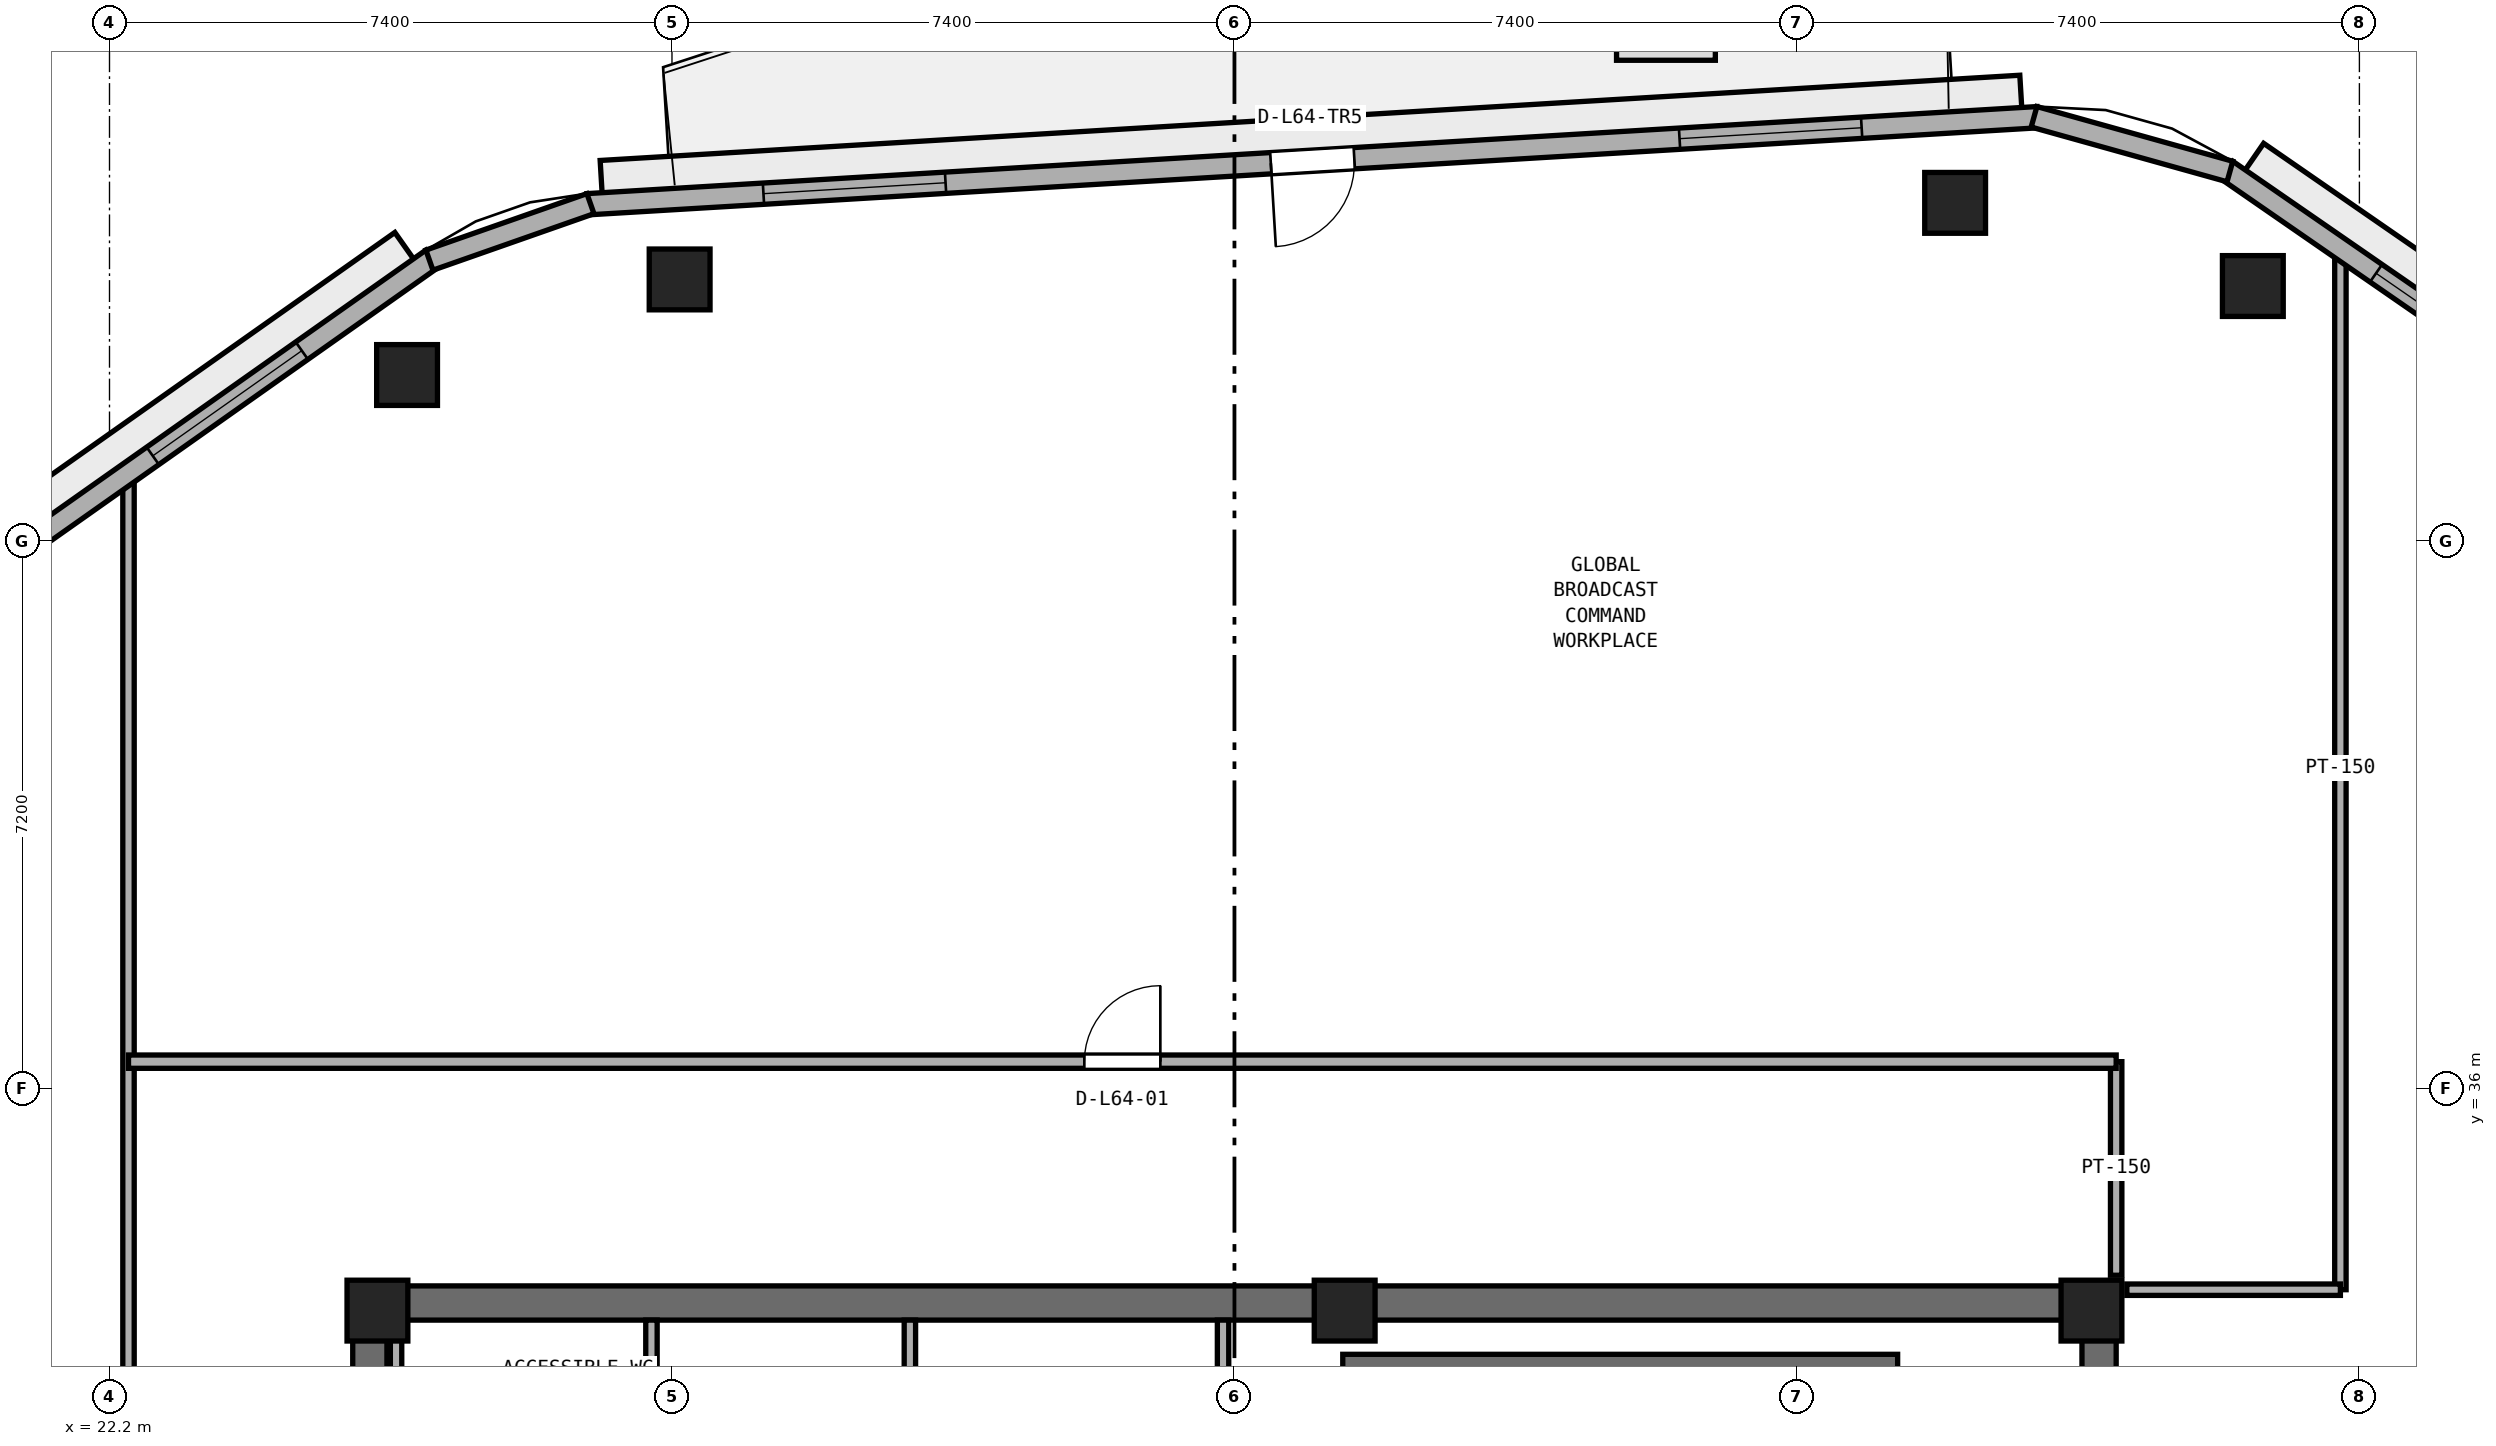
"""IFC4 building model, lengths in metres.
Left out: names, types, materials, properties, quantities, classifications, styles, units other than length and angle.
Written with IfcOpenShell. Run it as: python <this file> out.ifc"""

import sys

from ifc_helpers import new_model, si_unit, direction, frame, frame_2d, origin, origin_2d, place, context, subcontext, project, spatial, rectangle, extrude, element, fill, save


model = new_model("IFC4")
c1 = context("Model", 3, precision=1e-05, world=origin(), true_north=direction((0.0, 1.0)))
c2 = subcontext(c1, "Body", "Model", "MODEL_VIEW")
j1 = project(units=[si_unit("LENGTHUNIT", "METRE"), si_unit("PLANEANGLEUNIT", "RADIAN")], contexts=[c1])
p1 = place(None, origin())
s1 = spatial("IfcSite", under=j1, at=p1, CompositionType="ELEMENT")
p2 = place(p1, origin())
s2 = spatial("IfcBuilding", under=s1, at=p2, CompositionType="ELEMENT")
p3 = place(p2, frame((0.0, 0.0, 251.6)))
s3 = spatial("IfcBuildingStorey", under=s2, at=p3, CompositionType="ELEMENT", Elevation=251.6)
p4 = place(p3, frame((25.4, 33.175, 0.0), z_axis=(0.0, 0.0, 1.0), x_axis=(1.0, 0.0, 0.0)))
e1 = element("IfcWall", 1, at=p4, inside=s3, PredefinedType="SHEAR", context=c2, shape_type="SweptSolid", body=[
    extrude(rectangle(XDim=23.2, YDim=0.45, at=frame_2d((11.6, 0.0))), origin(), (0.0, 0.0, 1.0), 3.51),
])
p5 = place(p3, frame((25.625, 17.45, 0.0), z_axis=(0.0, 0.0, 1.0), x_axis=(0.0, 1.0, 0.0)))
e2 = element("IfcWall", 2, at=p5, inside=s3, PredefinedType="SHEAR", context=c2, shape_type="SweptSolid", body=[
    extrude(rectangle(XDim=15.5, YDim=0.45, at=frame_2d((7.75, 0.0))), origin(), (0.0, 0.0, 1.0), 3.51),
])
p6 = place(p5, frame((7.0, 0.0, 0.0)))
e3 = element("IfcOpeningElement", 3, at=p6, cuts=e2, PredefinedType="OPENING", context=c2, shape_type="SweptSolid", body=[
    extrude(rectangle(XDim=1.5, YDim=2.15, at=frame_2d((0.75, 1.075))), frame((0.0, 0.235, 0.0), z_axis=(0.0, -1.0, 0.0), x_axis=(1.0, 0.0, 0.0)), (0.0, 0.0, 1.0), 0.47),
])
p7 = place(p3, frame((48.375, 17.45, 0.0), z_axis=(0.0, 0.0, 1.0), x_axis=(0.0, 1.0, 0.0)))
e4 = element("IfcWall", 4, at=p7, inside=s3, PredefinedType="SHEAR", context=c2, shape_type="SweptSolid", body=[
    extrude(rectangle(XDim=15.5, YDim=0.45, at=frame_2d((7.75, 0.0))), origin(), (0.0, 0.0, 1.0), 3.51),
])
p8 = place(p7, frame((5.85, 0.0, 0.0)))
e5 = element("IfcOpeningElement", 5, at=p8, cuts=e4, PredefinedType="OPENING", context=c2, shape_type="SweptSolid", body=[
    extrude(rectangle(XDim=1.5, YDim=2.15, at=frame_2d((0.75, 1.075))), frame((0.0, 0.235, 0.0), z_axis=(0.0, -1.0, 0.0), x_axis=(1.0, 0.0, 0.0)), (0.0, 0.0, 1.0), 0.47),
])
for number, where, z_axis, x_axis in (
    (6, (48.275, 33.075, 0.0), (0.0, 0.0, 1.0), (1.0, 0.0, 0.0)),
    (7, (38.45, 33.075, 0.0), (0.0, 0.0, 1.0), (1.0, 0.0, 0.0)),
    (8, (25.725, 33.075, 0.0), (0.0, 0.0, 1.0), (1.0, 0.0, 0.0)),
):
    element("IfcColumn", number, at=place(p3, frame(where, z_axis=z_axis, x_axis=x_axis)), inside=s3, PredefinedType="PILASTER", context=c2, shape_type="SweptSolid", body=[
        extrude(rectangle(XDim=0.8, YDim=0.8, at=origin_2d()), origin(), (0.0, 0.0, 1.0), 3.8),
    ])
for number, where, z_axis, x_axis in (
    (9, (50.398, 46.554, 0.0), (0.0, 0.0, 1.0), (1.0, 0.0, 0.0)),
    (10, (46.481, 47.648, 0.0), (0.0, 0.0, 1.0), (1.0, 0.0, 0.0)),
    (11, (29.701, 46.641, 0.0), (0.0, 0.0, 1.0), (1.0, 0.0, 0.0)),
    (12, (26.115, 45.384, 0.0), (0.0, 0.0, 1.0), (1.0, 0.0, 0.0)),
):
    element("IfcColumn", number, at=place(p3, frame(where, z_axis=z_axis, x_axis=x_axis)), inside=s3, PredefinedType="COLUMN", context=c2, shape_type="SweptSolid", body=[
        extrude(rectangle(XDim=0.8, YDim=0.8, at=origin_2d()), origin(), (0.0, 0.0, 1.0), 3.8),
    ])
p9 = place(p3, frame((38.425, 32.375, 0.0), z_axis=(0.0, 0.0, 1.0), x_axis=(1.0, 0.0, 0.0)))
e13 = element("IfcWall", 13, at=p9, inside=s3, PredefinedType="SHEAR", context=c2, shape_type="SweptSolid", body=[
    extrude(rectangle(XDim=7.3, YDim=0.25, at=frame_2d((3.65, 0.0))), origin(), (0.0, 0.0, 1.0), 3.51),
])
p10 = place(p3, frame((25.97, 30.65, 0.0), z_axis=(0.0, 0.0, 1.0), x_axis=(0.0, 1.0, 0.0)))
e14 = element("IfcWall", 14, at=p10, inside=s3, PredefinedType="PARTITIONING", context=c2, shape_type="SweptSolid", body=[
    extrude(rectangle(XDim=2.3, YDim=0.15, at=frame_2d((1.15, 0.0))), origin(), (0.0, 0.0, 1.0), 2.61),
])
for number, where, z_axis, x_axis in (
    (15, (29.33, 30.65, 0.0), (0.0, 0.0, 1.0), (0.0, 1.0, 0.0)),
    (16, (32.73, 30.65, 0.0), (0.0, 0.0, 1.0), (0.0, 1.0, 0.0)),
    (17, (36.85, 30.65, 0.0), (0.0, 0.0, 1.0), (0.0, 1.0, 0.0)),
):
    element("IfcWall", number, at=place(p3, frame(where, z_axis=z_axis, x_axis=x_axis)), inside=s3, PredefinedType="PARTITIONING", context=c2, shape_type="SweptSolid", body=[
        extrude(rectangle(XDim=2.3, YDim=0.15, at=frame_2d((1.15, 0.0))), origin(), (0.0, 0.0, 1.0), 3.51),
    ])
p11 = place(p3, frame((51.55, 33.35, 0.0), z_axis=(0.0, 0.0, 1.0), x_axis=(0.0, 1.0, 0.0)))
e18 = element("IfcWall", 18, at=p11, inside=s3, PredefinedType="PARTITIONING", context=c2, shape_type="SweptSolid", body=[
    extrude(rectangle(XDim=13.727, YDim=0.15, at=frame_2d((6.863, 0.0))), origin(), (0.0, 0.0, 1.0), 3.51),
])
p12 = place(p3, frame((48.6, 33.54, 0.0), z_axis=(0.0, 0.0, 1.0), x_axis=(0.0, 1.0, 0.0)))
e19 = element("IfcWall", 19, at=p12, inside=s3, PredefinedType="PARTITIONING", context=c2, shape_type="SweptSolid", body=[
    extrude(rectangle(XDim=2.81, YDim=0.15, at=frame_2d((1.405, 0.0))), origin(), (0.0, 0.0, 1.0), 2.893),
])
p13 = place(p3, frame((22.45, 6.02, 0.0), z_axis=(0.0, 0.0, 1.0), x_axis=(0.0, 1.0, 0.0)))
e20 = element("IfcWall", 20, at=p13, inside=s3, PredefinedType="PARTITIONING", context=c2, shape_type="SweptSolid", body=[
    extrude(rectangle(XDim=38.106, YDim=0.15, at=frame_2d((19.053, 0.0))), origin(), (0.0, 0.0, 1.0), 3.51),
])
p14 = place(p13, frame((11.005, 0.0, 0.0)))
e21 = element("IfcOpeningElement", 21, at=p14, cuts=e20, PredefinedType="OPENING", context=c2, shape_type="SweptSolid", body=[
    extrude(rectangle(XDim=0.9, YDim=2.1, at=frame_2d((0.45, 1.05))), frame((0.0, 0.085, 0.0), z_axis=(0.0, -1.0, 0.0), x_axis=(1.0, 0.0, 0.0)), (0.0, 0.0, 1.0), 0.17),
])
p15 = place(p13, frame((22.155, 0.0, 0.0)))
e22 = element("IfcOpeningElement", 22, at=p15, cuts=e20, PredefinedType="OPENING", context=c2, shape_type="SweptSolid", body=[
    extrude(rectangle(XDim=0.9, YDim=2.1, at=frame_2d((0.45, 1.05))), frame((0.0, 0.085, 0.0), z_axis=(0.0, -1.0, 0.0), x_axis=(1.0, 0.0, 0.0)), (0.0, 0.0, 1.0), 0.17),
])
p16 = place(p3, frame((48.74, 33.35, 0.0), z_axis=(0.0, 0.0, 1.0), x_axis=(1.0, 0.0, 0.0)))
e23 = element("IfcWall", 23, at=p16, inside=s3, PredefinedType="PARTITIONING", context=c2, shape_type="SweptSolid", body=[
    extrude(rectangle(XDim=2.81, YDim=0.15, at=frame_2d((1.405, 0.0))), origin(), (0.0, 0.0, 1.0), 2.893),
])
p17 = place(p3, frame((22.45, 36.35, 0.0), z_axis=(0.0, 0.0, 1.0), x_axis=(1.0, 0.0, 0.0)))
e24 = element("IfcWall", 24, at=p17, inside=s3, PredefinedType="PARTITIONING", context=c2, shape_type="SweptSolid", body=[
    extrude(rectangle(XDim=26.15, YDim=0.175, at=frame_2d((13.075, 0.0))), origin(), (0.0, 0.0, 1.0), 3.51),
])
p18 = place(p17, frame((12.575, 0.0, 0.0)))
e25 = element("IfcOpeningElement", 25, at=p18, cuts=e24, PredefinedType="OPENING", context=c2, shape_type="SweptSolid", body=[
    extrude(rectangle(XDim=1.0, YDim=2.12, at=frame_2d((0.5, 1.06))), frame((0.0, 0.097, 0.0), z_axis=(0.0, -1.0, 0.0), x_axis=(1.0, 0.0, 0.0)), (0.0, 0.0, 1.0), 0.195),
])
p19 = place(p3, frame((63.651, 38.683, 0.0), z_axis=(0.0, 0.0, 1.0), x_axis=(-0.822655095, 0.568540759022, 0.0)))
e26 = element("IfcWall", 26, at=p19, inside=s3, PredefinedType="STANDARD", context=c2, shape_type="SweptSolid", body=[
    extrude(rectangle(XDim=16.528, YDim=0.28, at=frame_2d((8.264, 0.0))), origin(), (0.0, 0.0, 1.0), 3.51),
])
p20 = place(p19, frame((1.888, 0.0, 0.9)))
e27 = element("IfcOpeningElement", 27, at=p20, cuts=e26, PredefinedType="OPENING", context=c2, shape_type="SweptSolid", body=[
    extrude(rectangle(XDim=2.4, YDim=1.75, at=frame_2d((1.2, 0.875))), frame((0.0, 0.15, 0.0), z_axis=(0.0, -1.0, 0.0), x_axis=(1.0, 0.0, 0.0)), (0.0, 0.0, 1.0), 0.3),
])
p21 = place(p19, frame((7.064, 0.0, 0.9)))
e28 = element("IfcOpeningElement", 28, at=p21, cuts=e26, PredefinedType="OPENING", context=c2, shape_type="SweptSolid", body=[
    extrude(rectangle(XDim=2.4, YDim=1.75, at=frame_2d((1.2, 0.875))), frame((0.0, 0.15, 0.0), z_axis=(0.0, -1.0, 0.0), x_axis=(1.0, 0.0, 0.0)), (0.0, 0.0, 1.0), 0.3),
])
p22 = place(p19, frame((11.74, 0.0, 0.9)))
e29 = element("IfcOpeningElement", 29, at=p22, cuts=e26, PredefinedType="OPENING", context=c2, shape_type="SweptSolid", body=[
    extrude(rectangle(XDim=2.4, YDim=1.75, at=frame_2d((1.2, 0.875))), frame((0.0, 0.15, 0.0), z_axis=(0.0, -1.0, 0.0), x_axis=(1.0, 0.0, 0.0)), (0.0, 0.0, 1.0), 0.3),
])
p23 = place(p3, frame((47.566, 48.775, 0.0), z_axis=(0.0, 0.0, 1.0), x_axis=(-0.998202767485, -0.059926913695, 0.0)))
e30 = element("IfcWall", 30, at=p23, inside=s3, PredefinedType="STANDARD", context=c2, shape_type="SweptSolid", body=[
    extrude(rectangle(XDim=19.111, YDim=0.28, at=frame_2d((9.556, 0.0))), origin(), (0.0, 0.0, 1.0), 3.51),
])
p24 = place(p23, frame((9.005, 0.0, 0.0)))
e31 = element("IfcOpeningElement", 31, at=p24, cuts=e30, PredefinedType="OPENING", context=c2, shape_type="SweptSolid", body=[
    extrude(rectangle(XDim=1.1, YDim=2.2, at=frame_2d((0.55, 1.1))), frame((0.0, 0.15, 0.0), z_axis=(0.0, -1.0, 0.0), x_axis=(1.0, 0.0, 0.0)), (0.0, 0.0, 1.0), 0.3),
])
p25 = place(p23, frame((2.319, 0.0, 0.9)))
e32 = element("IfcOpeningElement", 32, at=p25, cuts=e30, PredefinedType="OPENING", context=c2, shape_type="SweptSolid", body=[
    extrude(rectangle(XDim=2.4, YDim=1.75, at=frame_2d((1.2, 0.875))), frame((0.0, 0.15, 0.0), z_axis=(0.0, -1.0, 0.0), x_axis=(1.0, 0.0, 0.0)), (0.0, 0.0, 1.0), 0.3),
])
p26 = place(p23, frame((14.392, 0.0, 0.9)))
e33 = element("IfcOpeningElement", 33, at=p26, cuts=e30, PredefinedType="OPENING", context=c2, shape_type="SweptSolid", body=[
    extrude(rectangle(XDim=2.4, YDim=1.75, at=frame_2d((1.2, 0.875))), frame((0.0, 0.15, 0.0), z_axis=(0.0, -1.0, 0.0), x_axis=(1.0, 0.0, 0.0)), (0.0, 0.0, 1.0), 0.3),
])
p27 = place(p3, frame((26.443, 46.913, 0.0), z_axis=(0.0, 0.0, 1.0), x_axis=(-0.817024179766, -0.576603407619, 0.0)))
e34 = element("IfcWall", 34, at=p27, inside=s3, PredefinedType="STANDARD", context=c2, shape_type="SweptSolid", body=[
    extrude(rectangle(XDim=17.78, YDim=0.28, at=frame_2d((8.89, 0.0))), origin(), (0.0, 0.0, 1.0), 3.51),
])
p28 = place(p27, frame((2.097, 0.0, 0.9)))
e35 = element("IfcOpeningElement", 35, at=p28, cuts=e34, PredefinedType="OPENING", context=c2, shape_type="SweptSolid", body=[
    extrude(rectangle(XDim=2.4, YDim=1.75, at=frame_2d((1.2, 0.875))), frame((0.0, 0.15, 0.0), z_axis=(0.0, -1.0, 0.0), x_axis=(1.0, 0.0, 0.0)), (0.0, 0.0, 1.0), 0.3),
])
p29 = place(p27, frame((7.69, 0.0, 0.9)))
e36 = element("IfcOpeningElement", 36, at=p29, cuts=e34, PredefinedType="OPENING", context=c2, shape_type="SweptSolid", body=[
    extrude(rectangle(XDim=2.4, YDim=1.75, at=frame_2d((1.2, 0.875))), frame((0.0, 0.15, 0.0), z_axis=(0.0, -1.0, 0.0), x_axis=(1.0, 0.0, 0.0)), (0.0, 0.0, 1.0), 0.3),
])
p30 = place(p27, frame((13.283, 0.0, 0.9)))
e37 = element("IfcOpeningElement", 37, at=p30, cuts=e34, PredefinedType="OPENING", context=c2, shape_type="SweptSolid", body=[
    extrude(rectangle(XDim=2.4, YDim=1.75, at=frame_2d((1.2, 0.875))), frame((0.0, 0.15, 0.0), z_axis=(0.0, -1.0, 0.0), x_axis=(1.0, 0.0, 0.0)), (0.0, 0.0, 1.0), 0.3),
])
p31 = place(p3, frame((50.096, 48.061, 0.0), z_axis=(0.0, 0.0, 1.0), x_axis=(-0.963108887091, 0.269112005688, 0.0)))
e38 = element("IfcWall", 38, at=p31, inside=s3, PredefinedType="STANDARD", context=c2, shape_type="SweptSolid", body=[
    extrude(rectangle(XDim=2.675, YDim=0.28, at=frame_2d((1.338, 0.0))), origin(), (0.0, 0.0, 1.0), 3.51),
])
p32 = place(p3, frame((28.527, 47.638, 0.0), z_axis=(0.0, 0.0, 1.0), x_axis=(-0.943686979207, -0.330839667022, 0.0)))
e39 = element("IfcWall", 39, at=p32, inside=s3, PredefinedType="STANDARD", context=c2, shape_type="SweptSolid", body=[
    extrude(rectangle(XDim=2.245, YDim=0.28, at=frame_2d((1.123, 0.0))), origin(), (0.0, 0.0, 1.0), 3.51),
])
p33 = place(p18, origin())
e40 = element("IfcDoor", 40, at=p33, inside=s3, OperationType="SINGLE_SWING_RIGHT", PredefinedType="DOOR", context=c2, shape_type="SweptSolid", body=[
    extrude(rectangle(XDim=1.0, YDim=2.12, at=frame_2d((0.5, 1.06))), frame((0.0, 0.025, 0.0), z_axis=(0.0, -1.0, 0.0), x_axis=(1.0, 0.0, 0.0)), (0.0, 0.0, 1.0), 0.05),
])
fill(e25, e40)
p34 = place(p22, origin())
e41 = element("IfcWindow", 41, at=p34, inside=s3, PartitioningType="SINGLE_PANEL", PredefinedType="WINDOW", context=c2, shape_type="SweptSolid", body=[
    extrude(rectangle(XDim=2.4, YDim=1.75, at=frame_2d((1.2, 0.875))), frame((0.0, 0.03, 0.0), z_axis=(0.0, -1.0, 0.0), x_axis=(1.0, 0.0, 0.0)), (0.0, 0.0, 1.0), 0.06),
])
fill(e29, e41)
p35 = place(p24, origin())
e42 = element("IfcDoor", 42, at=p35, inside=s3, OperationType="SINGLE_SWING_RIGHT", PredefinedType="DOOR", context=c2, shape_type="SweptSolid", body=[
    extrude(rectangle(XDim=1.1, YDim=2.2, at=frame_2d((0.55, 1.1))), frame((0.0, 0.025, 0.0), z_axis=(0.0, -1.0, 0.0), x_axis=(1.0, 0.0, 0.0)), (0.0, 0.0, 1.0), 0.05),
])
fill(e31, e42)
p36 = place(p25, origin())
e43 = element("IfcWindow", 43, at=p36, inside=s3, PartitioningType="SINGLE_PANEL", PredefinedType="WINDOW", context=c2, shape_type="SweptSolid", body=[
    extrude(rectangle(XDim=2.4, YDim=1.75, at=frame_2d((1.2, 0.875))), frame((0.0, 0.03, 0.0), z_axis=(0.0, -1.0, 0.0), x_axis=(1.0, 0.0, 0.0)), (0.0, 0.0, 1.0), 0.06),
])
fill(e32, e43)
p37 = place(p26, origin())
e44 = element("IfcWindow", 44, at=p37, inside=s3, PartitioningType="SINGLE_PANEL", PredefinedType="WINDOW", context=c2, shape_type="SweptSolid", body=[
    extrude(rectangle(XDim=2.4, YDim=1.75, at=frame_2d((1.2, 0.875))), frame((0.0, 0.03, 0.0), z_axis=(0.0, -1.0, 0.0), x_axis=(1.0, 0.0, 0.0)), (0.0, 0.0, 1.0), 0.06),
])
fill(e33, e44)
p38 = place(p28, origin())
e45 = element("IfcWindow", 45, at=p38, inside=s3, PartitioningType="SINGLE_PANEL", PredefinedType="WINDOW", context=c2, shape_type="SweptSolid", body=[
    extrude(rectangle(XDim=2.4, YDim=1.75, at=frame_2d((1.2, 0.875))), frame((0.0, 0.03, 0.0), z_axis=(0.0, -1.0, 0.0), x_axis=(1.0, 0.0, 0.0)), (0.0, 0.0, 1.0), 0.06),
])
fill(e35, e45)
save(model, sys.argv[1])
